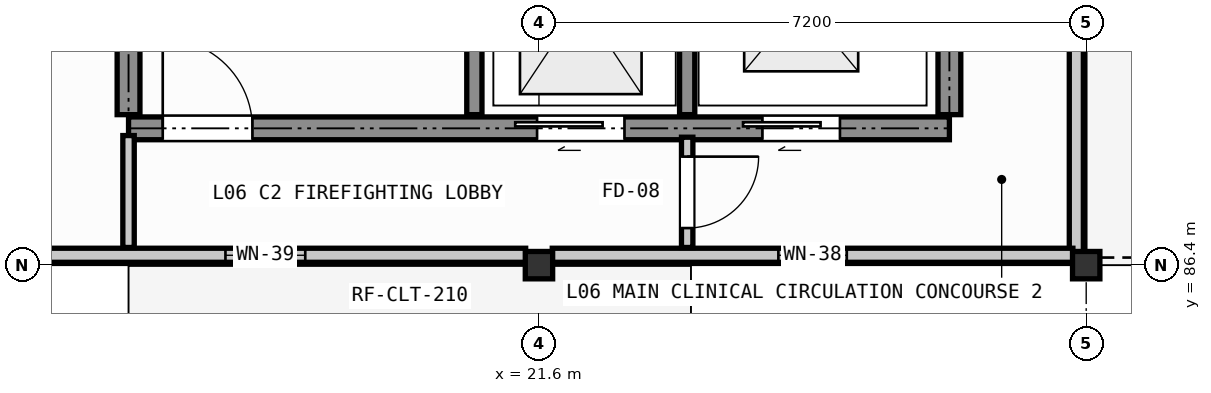
"""IFC4 building model, lengths in metres.
Left out: names, types, materials, properties, quantities, classifications, styles, units other than length and angle.
Written with IfcOpenShell. Run it as: python <this file> out.ifc"""

import sys

from ifc_helpers import new_model, si_unit, direction, frame, frame_2d, origin, origin_2d, place, context, subcontext, project, spatial, rectangle, extrude, element, fill, save


model = new_model("IFC4")
c1 = context("Model", 3, precision=1e-05, world=origin(), true_north=direction((0.0, 1.0)))
c2 = subcontext(c1, "Body", "Model", "MODEL_VIEW")
j1 = project(units=[si_unit("LENGTHUNIT", "METRE"), si_unit("PLANEANGLEUNIT", "RADIAN")], contexts=[c1])
p1 = place(None, origin())
s1 = spatial("IfcSite", under=j1, at=p1, CompositionType="ELEMENT")
p2 = place(p1, origin())
s2 = spatial("IfcBuilding", under=s1, at=p2, CompositionType="ELEMENT")
p3 = place(p2, frame((0.0, 0.0, 21.6)))
s3 = spatial("IfcBuildingStorey", under=s2, at=p3, CompositionType="ELEMENT", Elevation=21.6)
for number, where, z_axis, x_axis in (
    (1, (21.6, 86.4, 0.0), (0.0, 0.0, 1.0), (1.0, 0.0, 0.0)),
    (2, (28.8, 86.4, 0.0), (0.0, 0.0, 1.0), (1.0, 0.0, 0.0)),
):
    element("IfcColumn", number, at=place(p3, frame(where, z_axis=z_axis, x_axis=x_axis)), inside=s3, PredefinedType="COLUMN", context=c2, shape_type="SweptSolid", body=[
        extrude(rectangle(XDim=0.36, YDim=0.36, at=origin_2d()), origin(), (0.0, 0.0, 1.0), 3.69),
    ])
p4 = place(p3, frame((28.67, 93.425, 0.0), z_axis=(0.0, 0.0, 1.0), x_axis=(0.0, -1.0, 0.0)))
e3 = element("IfcWall", 3, at=p4, inside=s3, PredefinedType="SOLIDWALL", context=c2, shape_type="SweptSolid", body=[
    extrude(rectangle(XDim=6.85, YDim=0.185, at=frame_2d((3.425, 0.0))), origin(), (0.0, 0.0, 1.0), 3.05),
])
p5 = place(p4, frame((3.05, 0.0, 0.95)))
e4 = element("IfcOpeningElement", 4, at=p5, cuts=e3, PredefinedType="OPENING", context=c2, shape_type="SweptSolid", body=[
    extrude(rectangle(XDim=0.75, YDim=1.55, at=frame_2d((0.375, 0.775))), frame((0.0, 0.103, 0.0), z_axis=(0.0, -1.0, 0.0), x_axis=(1.0, 0.0, 0.0)), (0.0, 0.0, 1.0), 0.205),
])
p6 = place(p3, frame((28.625, 86.53, 0.0), z_axis=(0.0, 0.0, 1.0), x_axis=(-1.0, 0.0, 0.0)))
e5 = element("IfcWall", 5, at=p6, inside=s3, PredefinedType="SOLIDWALL", context=c2, shape_type="SweptSolid", body=[
    extrude(rectangle(XDim=6.85, YDim=0.185, at=frame_2d((3.425, 0.0))), origin(), (0.0, 0.0, 1.0), 3.05),
])
p7 = place(p6, frame((2.975, 0.0, 0.95)))
e6 = element("IfcOpeningElement", 6, at=p7, cuts=e5, PredefinedType="OPENING", context=c2, shape_type="SweptSolid", body=[
    extrude(rectangle(XDim=0.9, YDim=1.55, at=frame_2d((0.45, 0.775))), frame((0.0, 0.103, 0.0), z_axis=(0.0, -1.0, 0.0), x_axis=(1.0, 0.0, 0.0)), (0.0, 0.0, 1.0), 0.205),
])
p8 = place(p3, frame((21.425, 86.53, 0.0), z_axis=(0.0, 0.0, 1.0), x_axis=(-1.0, 0.0, 0.0)))
e7 = element("IfcWall", 7, at=p8, inside=s3, PredefinedType="SOLIDWALL", context=c2, shape_type="SweptSolid", body=[
    extrude(rectangle(XDim=6.85, YDim=0.185, at=frame_2d((3.425, 0.0))), origin(), (0.0, 0.0, 1.0), 3.05),
])
p9 = place(p8, frame((2.9, 0.0, 0.95)))
e8 = element("IfcOpeningElement", 8, at=p9, cuts=e7, PredefinedType="OPENING", context=c2, shape_type="SweptSolid", body=[
    extrude(rectangle(XDim=1.05, YDim=1.55, at=frame_2d((0.525, 0.775))), frame((0.0, 0.103, 0.0), z_axis=(0.0, -1.0, 0.0), x_axis=(1.0, 0.0, 0.0)), (0.0, 0.0, 1.0), 0.205),
])
p10 = place(p3, frame((16.2, 88.2, 0.0), z_axis=(0.0, 0.0, 1.0), x_axis=(1.0, 0.0, 0.0)))
e9 = element("IfcWall", 9, at=p10, inside=s3, PredefinedType="SHEAR", context=c2, shape_type="SweptSolid", body=[
    extrude(rectangle(XDim=10.8, YDim=0.3, at=frame_2d((5.4, 0.0))), origin(), (0.0, 0.0, 1.0), 3.685),
])
p11 = place(p10, frame((0.45, 0.0, 0.0)))
e10 = element("IfcOpeningElement", 10, at=p11, cuts=e9, PredefinedType="OPENING", context=c2, shape_type="SweptSolid", body=[
    extrude(rectangle(XDim=1.18, YDim=2.16, at=frame_2d((0.59, 1.08))), frame((0.0, 0.16, 0.0), z_axis=(0.0, -1.0, 0.0), x_axis=(1.0, 0.0, 0.0)), (0.0, 0.0, 1.0), 0.32),
])
p12 = place(p10, frame((5.375, 0.0, 0.0)))
e11 = element("IfcOpeningElement", 11, at=p12, cuts=e9, PredefinedType="OPENING", context=c2, shape_type="SweptSolid", body=[
    extrude(rectangle(XDim=1.15, YDim=2.15, at=frame_2d((0.575, 1.075))), frame((0.0, 0.16, 0.0), z_axis=(0.0, -1.0, 0.0), x_axis=(1.0, 0.0, 0.0)), (0.0, 0.0, 1.0), 0.32),
])
p13 = place(p10, frame((8.34, 0.0, 0.0)))
e12 = element("IfcOpeningElement", 12, at=p13, cuts=e9, PredefinedType="OPENING", context=c2, shape_type="SweptSolid", body=[
    extrude(rectangle(XDim=1.02, YDim=2.12, at=frame_2d((0.51, 1.06))), frame((0.0, 0.16, 0.0), z_axis=(0.0, -1.0, 0.0), x_axis=(1.0, 0.0, 0.0)), (0.0, 0.0, 1.0), 0.32),
])
for number, where, z_axis, x_axis in (
    (13, (16.2, 88.38, 0.0), (0.0, 0.0, 1.0), (0.0, 1.0, 0.0)),
    (14, (27.0, 88.38, 0.0), (0.0, 0.0, 1.0), (0.0, 1.0, 0.0)),
):
    element("IfcWall", number, at=place(p3, frame(where, z_axis=z_axis, x_axis=x_axis)), inside=s3, PredefinedType="SHEAR", context=c2, shape_type="SweptSolid", body=[
        extrude(rectangle(XDim=6.24, YDim=0.3, at=frame_2d((3.12, 0.0))), origin(), (0.0, 0.0, 1.0), 3.685),
    ])
for number, where, z_axis, x_axis in (
    (15, (20.75, 88.38, 0.0), (0.0, 0.0, 1.0), (0.0, 1.0, 0.0)),
    (16, (23.55, 88.38, 0.0), (0.0, 0.0, 1.0), (0.0, 1.0, 0.0)),
):
    element("IfcWall", number, at=place(p3, frame(where, z_axis=z_axis, x_axis=x_axis)), inside=s3, PredefinedType="SHEAR", context=c2, shape_type="SweptSolid", body=[
        extrude(rectangle(XDim=3.15, YDim=0.2, at=frame_2d((1.575, 0.0))), origin(), (0.0, 0.0, 1.0), 3.685),
    ])
p14 = place(p3, frame((16.2, 86.633, 0.0), z_axis=(0.0, 0.0, 1.0), x_axis=(0.0, 1.0, 0.0)))
e17 = element("IfcWall", 17, at=p14, inside=s3, PredefinedType="PARTITIONING", context=c2, shape_type="SweptSolid", body=[
    extrude(rectangle(XDim=1.472, YDim=0.15, at=frame_2d((0.736, 0.0))), origin(), (0.0, 0.0, 1.0), 3.05),
])
p15 = place(p3, frame((23.55, 88.083, 0.0), z_axis=(0.0, 0.0, 1.0), x_axis=(0.0, -1.0, 0.0)))
e18 = element("IfcWall", 18, at=p15, inside=s3, PredefinedType="PARTITIONING", context=c2, shape_type="SweptSolid", body=[
    extrude(rectangle(XDim=1.451, YDim=0.15, at=frame_2d((0.725, 0.0))), origin(), (0.0, 0.0, 1.0), 3.05),
])
p16 = place(p15, frame((0.255, 0.0, 0.0)))
e19 = element("IfcOpeningElement", 19, at=p16, cuts=e18, PredefinedType="OPENING", context=c2, shape_type="SweptSolid", body=[
    extrude(rectangle(XDim=0.94, YDim=2.1, at=frame_2d((0.47, 1.05))), frame((0.0, 0.085, 0.0), z_axis=(0.0, -1.0, 0.0), x_axis=(1.0, 0.0, 0.0)), (0.0, 0.0, 1.0), 0.17),
])
p17 = place(p7, origin())
e20 = element("IfcWindow", 20, at=p17, inside=s3, PartitioningType="SINGLE_PANEL", PredefinedType="WINDOW", context=c2, shape_type="SweptSolid", body=[
    extrude(rectangle(XDim=0.9, YDim=1.55, at=frame_2d((0.45, 0.775))), frame((0.0, 0.03, 0.0), z_axis=(0.0, -1.0, 0.0), x_axis=(1.0, 0.0, 0.0)), (0.0, 0.0, 1.0), 0.06),
])
fill(e6, e20)
p18 = place(p9, origin())
e21 = element("IfcWindow", 21, at=p18, inside=s3, PartitioningType="SINGLE_PANEL", PredefinedType="WINDOW", context=c2, shape_type="SweptSolid", body=[
    extrude(rectangle(XDim=1.05, YDim=1.55, at=frame_2d((0.525, 0.775))), frame((0.0, 0.03, 0.0), z_axis=(0.0, -1.0, 0.0), x_axis=(1.0, 0.0, 0.0)), (0.0, 0.0, 1.0), 0.06),
])
fill(e8, e21)
p19 = place(p11, origin())
e22 = element("IfcDoor", 22, at=p19, inside=s3, OperationType="SINGLE_SWING_LEFT", PredefinedType="DOOR", context=c2, shape_type="SweptSolid", body=[
    extrude(rectangle(XDim=1.18, YDim=2.16, at=frame_2d((0.59, 1.08))), frame((0.0, 0.025, 0.0), z_axis=(0.0, -1.0, 0.0), x_axis=(1.0, 0.0, 0.0)), (0.0, 0.0, 1.0), 0.05),
])
fill(e10, e22)
p20 = place(p12, origin())
e23 = element("IfcDoor", 23, at=p20, inside=s3, OperationType="DOUBLE_DOOR_SLIDING", PredefinedType="DOOR", context=c2, shape_type="SweptSolid", body=[
    extrude(rectangle(XDim=1.15, YDim=2.15, at=frame_2d((0.575, 1.075))), frame((0.0, 0.025, 0.0), z_axis=(0.0, -1.0, 0.0), x_axis=(1.0, 0.0, 0.0)), (0.0, 0.0, 1.0), 0.05),
])
fill(e11, e23)
p21 = place(p13, origin())
e24 = element("IfcDoor", 24, at=p21, inside=s3, OperationType="SLIDING_TO_LEFT", PredefinedType="DOOR", context=c2, shape_type="SweptSolid", body=[
    extrude(rectangle(XDim=1.02, YDim=2.12, at=frame_2d((0.51, 1.06))), frame((0.0, 0.025, 0.0), z_axis=(0.0, -1.0, 0.0), x_axis=(1.0, 0.0, 0.0)), (0.0, 0.0, 1.0), 0.05),
])
fill(e12, e24)
p22 = place(p16, origin())
e25 = element("IfcDoor", 25, at=p22, inside=s3, OperationType="SINGLE_SWING_LEFT", PredefinedType="DOOR", context=c2, shape_type="SweptSolid", body=[
    extrude(rectangle(XDim=0.94, YDim=2.1, at=frame_2d((0.47, 1.05))), frame((0.0, 0.025, 0.0), z_axis=(0.0, -1.0, 0.0), x_axis=(1.0, 0.0, 0.0)), (0.0, 0.0, 1.0), 0.05),
])
fill(e19, e25)
save(model, sys.argv[1])
